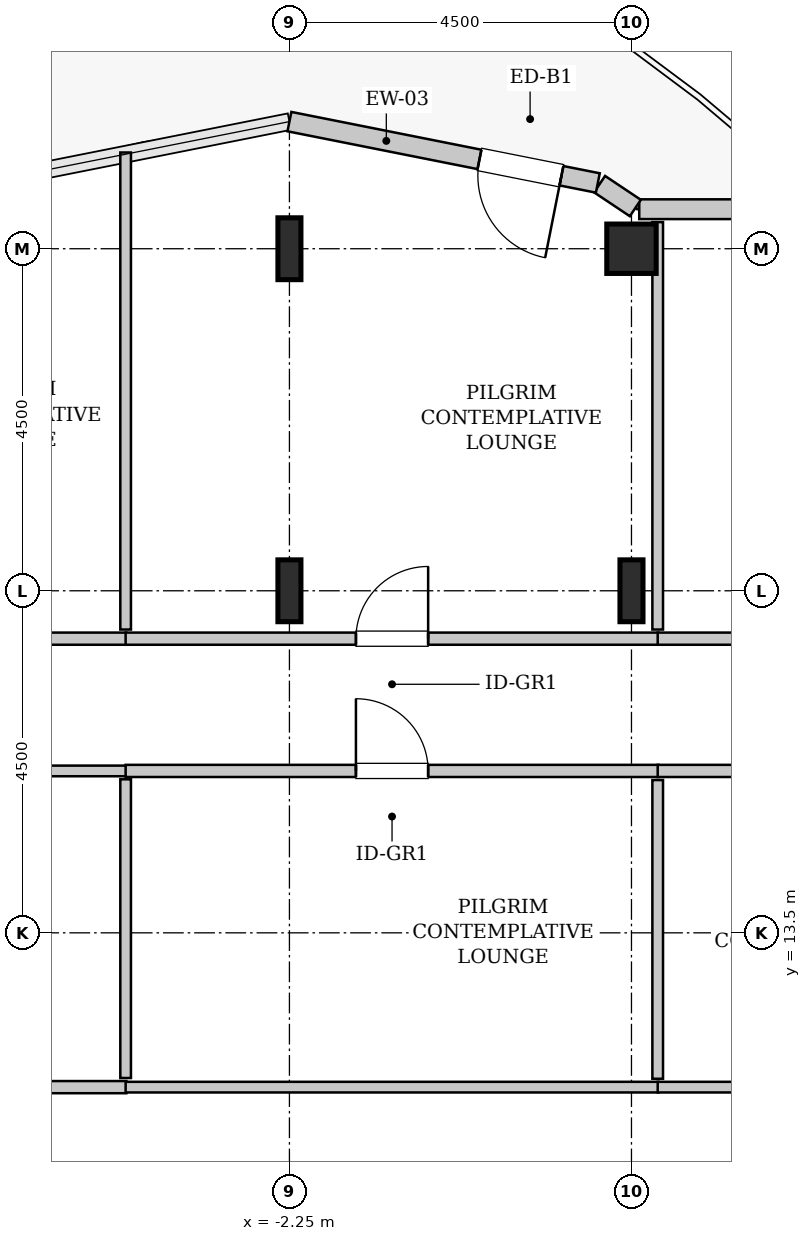
"""IFC4 building model, lengths in metres.
Left out: names, types, materials, properties, quantities, classifications, styles, units other than length and angle.
Written with IfcOpenShell. Run it as: python <this file> out.ifc"""

import sys

from ifc_helpers import new_model, si_unit, direction, frame, frame_2d, origin, origin_2d, place, context, subcontext, project, spatial, rectangle, hollow_rectangle, i_section, extrude, source, transform, mapped, element, fill, save


model = new_model("IFC4")
c1 = context("Model", 3, precision=1e-05, world=origin(), true_north=direction((0.0, 1.0)))
c2 = subcontext(c1, "Body", "Model", "MODEL_VIEW")
j1 = project(units=[si_unit("LENGTHUNIT", "METRE"), si_unit("PLANEANGLEUNIT", "RADIAN")], contexts=[c1])
p1 = place(None, origin())
s1 = spatial("IfcSite", under=j1, at=p1, CompositionType="ELEMENT")
p2 = place(p1, origin())
s2 = spatial("IfcBuilding", under=s1, at=p2, CompositionType="ELEMENT")
p3 = place(p2, frame((0.0, 0.0, 256.0)))
s3 = spatial("IfcBuildingStorey", under=s2, at=p3, CompositionType="ELEMENT", Elevation=256.0)
m1 = source(origin(), c2, "Body", "SweptSolid", [
    extrude(i_section(OverallWidth=0.303, OverallDepth=0.814, WebThickness=0.021, FlangeThickness=0.04, FilletRadius=0.03, at=origin_2d()), origin(), (0.0, 0.0, 1.0), 3.8),
])
for number, where, z_axis, x_axis in (
    (1, (-2.25, 18.0, 0.0), (0.0, 0.0, 1.0), (1.0, 0.0, 0.0)),
    (2, (-2.25, 22.5, 0.0), (0.0, 0.0, 1.0), (1.0, 0.0, 0.0)),
    (3, (2.25, 18.0, 0.0), (0.0, 0.0, 1.0), (1.0, 0.0, 0.0)),
):
    element("IfcColumn", number, at=place(p3, frame(where, z_axis=z_axis, x_axis=x_axis)), inside=s3, PredefinedType="COLUMN", context=c2, shape_type="MappedRepresentation", body=[
        mapped(m1, transform((0.0, 0.0, 0.0), x_axis=(1.0, 0.0, 0.0), y_axis=(0.0, 1.0, 0.0), z_axis=(0.0, 0.0, 1.0), scale=1.0)),
    ])
m2 = source(origin(), c2, "Body", "SweptSolid", [
    extrude(hollow_rectangle(XDim=0.65, YDim=0.65, WallThickness=0.032, InnerFilletRadius=0.032, OuterFilletRadius=0.064, at=origin_2d()), origin(), (0.0, 0.0, 1.0), 3.8),
])
p4 = place(p3, frame((2.25, 22.5, 0.0), z_axis=(0.0, 0.0, 1.0), x_axis=(1.0, 0.0, 0.0)))
e4 = element("IfcColumn", 4, at=p4, inside=s3, PredefinedType="COLUMN", context=c2, shape_type="MappedRepresentation", body=[
    mapped(m2, transform((0.0, 0.0, 0.0), x_axis=(1.0, 0.0, 0.0), y_axis=(0.0, 1.0, 0.0), z_axis=(0.0, 0.0, 1.0), scale=1.0)),
])
m3 = source(origin(), c2, "Body", "SweptSolid", [
    extrude(rectangle(XDim=1.37, YDim=0.26, at=frame_2d((0.685, 0.0))), origin(), (0.0, 0.0, 1.0), 3.5),
])
p5 = place(p3, frame((3.722, 23.02, 0.0), z_axis=(0.0, 0.0, 1.0), x_axis=(-1.0, 0.0, 0.0)))
e5 = element("IfcWall", 5, at=p5, inside=s3, PredefinedType="SOLIDWALL", context=c2, shape_type="MappedRepresentation", body=[
    mapped(m3, transform((0.0, 0.0, 0.0), x_axis=(1.0, 0.0, 0.0), y_axis=(0.0, 1.0, 0.0), z_axis=(0.0, 0.0, 1.0), scale=1.0)),
])
m4 = source(origin(), c2, "Body", "SweptSolid", [
    extrude(rectangle(XDim=0.565, YDim=0.26, at=frame_2d((0.283, 0.0))), origin(), (0.0, 0.0, 1.0), 3.5),
])
p6 = place(p3, frame((2.301, 23.036, 0.0), z_axis=(0.0, 0.0, 1.0), x_axis=(-0.831651492666, 0.555297933317, 0.0)))
e6 = element("IfcWall", 6, at=p6, inside=s3, PredefinedType="SOLIDWALL", context=c2, shape_type="MappedRepresentation", body=[
    mapped(m4, transform((0.0, 0.0, 0.0), x_axis=(1.0, 0.0, 0.0), y_axis=(0.0, 1.0, 0.0), z_axis=(0.0, 0.0, 1.0), scale=1.0)),
])
m5 = source(origin(), c2, "Body", "SweptSolid", [
    extrude(rectangle(XDim=4.137, YDim=0.26, at=frame_2d((2.068, 0.0))), origin(), (0.0, 0.0, 1.0), 3.5),
])
p7 = place(p3, frame((1.807, 23.365, 0.0), z_axis=(0.0, 0.0, 1.0), x_axis=(-0.980782170794, 0.195105954428, 0.0)))
e7 = element("IfcWall", 7, at=p7, inside=s3, PredefinedType="SOLIDWALL", context=c2, shape_type="MappedRepresentation", body=[
    mapped(m5, transform((0.0, 0.0, 0.0), x_axis=(1.0, 0.0, 0.0), y_axis=(0.0, 1.0, 0.0), z_axis=(0.0, 0.0, 1.0), scale=1.0)),
])
p8 = place(p7, frame((0.488, 0.0, 0.0)))
e8 = element("IfcOpeningElement", 8, at=p8, cuts=e7, PredefinedType="OPENING", context=c2, shape_type="SweptSolid", body=[
    extrude(rectangle(XDim=1.1, YDim=2.2, at=frame_2d((0.55, 1.1))), frame((0.0, 0.14, 0.0), z_axis=(0.0, -1.0, 0.0), x_axis=(1.0, 0.0, 0.0)), (0.0, 0.0, 1.0), 0.28),
])
m6 = source(origin(), c2, "Body", "SweptSolid", [
    extrude(rectangle(XDim=7.615, YDim=0.16, at=frame_2d((3.808, 0.0))), origin(), (0.0, 0.0, 1.0), 3.485),
])
p9 = place(p3, frame((-12.01, 11.47, 0.0), z_axis=(0.0, 0.0, 1.0), x_axis=(1.0, 0.0, 0.0)))
e9 = element("IfcWall", 9, at=p9, inside=s3, PredefinedType="PARTITIONING", context=c2, shape_type="MappedRepresentation", body=[
    mapped(m6, transform((0.0, 0.0, 0.0), x_axis=(1.0, 0.0, 0.0), y_axis=(0.0, 1.0, 0.0), z_axis=(0.0, 0.0, 1.0), scale=1.0)),
])
p10 = place(p9, frame((3.333, 0.0, 0.0)))
e10 = element("IfcOpeningElement", 10, at=p10, cuts=e9, PredefinedType="OPENING", context=c2, shape_type="SweptSolid", body=[
    extrude(rectangle(XDim=0.95, YDim=2.1, at=frame_2d((0.475, 1.05))), frame((0.0, 0.09, 0.0), z_axis=(0.0, -1.0, 0.0), x_axis=(1.0, 0.0, 0.0)), (0.0, 0.0, 1.0), 0.18),
])
m7 = source(origin(), c2, "Body", "SweptSolid", [
    extrude(rectangle(XDim=7.615, YDim=0.14, at=frame_2d((3.808, 0.0))), origin(), (0.0, 0.0, 1.0), 3.485),
])
p11 = place(p3, frame((-12.01, 15.63, 0.0), z_axis=(0.0, 0.0, 1.0), x_axis=(1.0, 0.0, 0.0)))
e11 = element("IfcWall", 11, at=p11, inside=s3, PredefinedType="PARTITIONING", context=c2, shape_type="MappedRepresentation", body=[
    mapped(m7, transform((0.0, 0.0, 0.0), x_axis=(1.0, 0.0, 0.0), y_axis=(0.0, 1.0, 0.0), z_axis=(0.0, 0.0, 1.0), scale=1.0)),
])
m8 = source(origin(), c2, "Body", "SweptSolid", [
    extrude(rectangle(XDim=3.93, YDim=0.14, at=frame_2d((1.965, 0.0))), origin(), (0.0, 0.0, 1.0), 3.485),
])
p12 = place(p3, frame((-4.405, 11.59, 0.0), z_axis=(0.0, 0.0, 1.0), x_axis=(0.0, 1.0, 0.0)))
e12 = element("IfcWall", 12, at=p12, inside=s3, PredefinedType="PARTITIONING", context=c2, shape_type="MappedRepresentation", body=[
    mapped(m8, transform((0.0, 0.0, 0.0), x_axis=(1.0, 0.0, 0.0), y_axis=(0.0, 1.0, 0.0), z_axis=(0.0, 0.0, 1.0), scale=1.0)),
])
m9 = source(origin(), c2, "Body", "SweptSolid", [
    extrude(rectangle(XDim=3.045, YDim=0.16, at=frame_2d((1.522, 0.0))), origin(), (0.0, 0.0, 1.0), 3.485),
])
p13 = place(p3, frame((-7.44, 17.37, 0.0), z_axis=(0.0, 0.0, 1.0), x_axis=(1.0, 0.0, 0.0)))
e13 = element("IfcWall", 13, at=p13, inside=s3, PredefinedType="PARTITIONING", context=c2, shape_type="MappedRepresentation", body=[
    mapped(m9, transform((0.0, 0.0, 0.0), x_axis=(1.0, 0.0, 0.0), y_axis=(0.0, 1.0, 0.0), z_axis=(0.0, 0.0, 1.0), scale=1.0)),
])
p14 = place(p13, frame((1.048, 0.0, 0.0)))
e14 = element("IfcOpeningElement", 14, at=p14, cuts=e13, PredefinedType="OPENING", context=c2, shape_type="SweptSolid", body=[
    extrude(rectangle(XDim=0.95, YDim=2.1, at=frame_2d((0.475, 1.05))), frame((0.0, 0.09, 0.0), z_axis=(0.0, -1.0, 0.0), x_axis=(1.0, 0.0, 0.0)), (0.0, 0.0, 1.0), 0.18),
])
m10 = source(origin(), c2, "Body", "SweptSolid", [
    extrude(rectangle(XDim=6.276, YDim=0.14, at=frame_2d((3.138, 0.0))), origin(), (0.0, 0.0, 1.0), 3.485),
])
p15 = place(p3, frame((-4.405, 17.49, 0.0), z_axis=(0.0, 0.0, 1.0), x_axis=(0.0, 1.0, 0.0)))
e15 = element("IfcWall", 15, at=p15, inside=s3, PredefinedType="PARTITIONING", context=c2, shape_type="MappedRepresentation", body=[
    mapped(m10, transform((0.0, 0.0, 0.0), x_axis=(1.0, 0.0, 0.0), y_axis=(0.0, 1.0, 0.0), z_axis=(0.0, 0.0, 1.0), scale=1.0)),
])
m11 = source(origin(), c2, "Body", "SweptSolid", [
    extrude(rectangle(XDim=7.01, YDim=0.16, at=frame_2d((3.505, 0.0))), origin(), (0.0, 0.0, 1.0), 3.485),
])
p16 = place(p3, frame((-4.405, 17.37, 0.0), z_axis=(0.0, 0.0, 1.0), x_axis=(1.0, 0.0, 0.0)))
e16 = element("IfcWall", 16, at=p16, inside=s3, PredefinedType="PARTITIONING", context=c2, shape_type="MappedRepresentation", body=[
    mapped(m11, transform((0.0, 0.0, 0.0), x_axis=(1.0, 0.0, 0.0), y_axis=(0.0, 1.0, 0.0), z_axis=(0.0, 0.0, 1.0), scale=1.0)),
])
p17 = place(p16, frame((3.03, 0.0, 0.0)))
e17 = element("IfcOpeningElement", 17, at=p17, cuts=e16, PredefinedType="OPENING", context=c2, shape_type="SweptSolid", body=[
    extrude(rectangle(XDim=0.95, YDim=2.1, at=frame_2d((0.475, 1.05))), frame((0.0, 0.09, 0.0), z_axis=(0.0, -1.0, 0.0), x_axis=(1.0, 0.0, 0.0)), (0.0, 0.0, 1.0), 0.18),
])
m12 = source(origin(), c2, "Body", "SweptSolid", [
    extrude(rectangle(XDim=5.36, YDim=0.14, at=frame_2d((2.68, 0.0))), origin(), (0.0, 0.0, 1.0), 2.875),
])
p18 = place(p3, frame((2.595, 17.49, 0.0), z_axis=(0.0, 0.0, 1.0), x_axis=(0.0, 1.0, 0.0)))
e18 = element("IfcWall", 18, at=p18, inside=s3, PredefinedType="PARTITIONING", context=c2, shape_type="MappedRepresentation", body=[
    mapped(m12, transform((0.0, 0.0, 0.0), x_axis=(1.0, 0.0, 0.0), y_axis=(0.0, 1.0, 0.0), z_axis=(0.0, 0.0, 1.0), scale=1.0)),
])
p19 = place(p3, frame((-4.405, 15.63, 0.0), z_axis=(0.0, 0.0, 1.0), x_axis=(1.0, 0.0, 0.0)))
e19 = element("IfcWall", 19, at=p19, inside=s3, PredefinedType="PARTITIONING", context=c2, shape_type="MappedRepresentation", body=[
    mapped(m11, transform((0.0, 0.0, 0.0), x_axis=(1.0, 0.0, 0.0), y_axis=(0.0, 1.0, 0.0), z_axis=(0.0, 0.0, 1.0), scale=1.0)),
])
p20 = place(p19, frame((3.03, 0.0, 0.0)))
e20 = element("IfcOpeningElement", 20, at=p20, cuts=e19, PredefinedType="OPENING", context=c2, shape_type="SweptSolid", body=[
    extrude(rectangle(XDim=0.95, YDim=2.1, at=frame_2d((0.475, 1.05))), frame((0.0, 0.09, 0.0), z_axis=(0.0, -1.0, 0.0), x_axis=(1.0, 0.0, 0.0)), (0.0, 0.0, 1.0), 0.18),
])
m13 = source(origin(), c2, "Body", "SweptSolid", [
    extrude(rectangle(XDim=7.01, YDim=0.14, at=frame_2d((3.505, 0.0))), origin(), (0.0, 0.0, 1.0), 3.485),
])
p21 = place(p3, frame((-4.405, 11.47, 0.0), z_axis=(0.0, 0.0, 1.0), x_axis=(1.0, 0.0, 0.0)))
e21 = element("IfcWall", 21, at=p21, inside=s3, PredefinedType="PARTITIONING", context=c2, shape_type="MappedRepresentation", body=[
    mapped(m13, transform((0.0, 0.0, 0.0), x_axis=(1.0, 0.0, 0.0), y_axis=(0.0, 1.0, 0.0), z_axis=(0.0, 0.0, 1.0), scale=1.0)),
])
p22 = place(p3, frame((2.595, 11.58, 0.0), z_axis=(0.0, 0.0, 1.0), x_axis=(0.0, 1.0, 0.0)))
e22 = element("IfcWall", 22, at=p22, inside=s3, PredefinedType="PARTITIONING", context=c2, shape_type="MappedRepresentation", body=[
    mapped(m8, transform((0.0, 0.0, 0.0), x_axis=(1.0, 0.0, 0.0), y_axis=(0.0, 1.0, 0.0), z_axis=(0.0, 0.0, 1.0), scale=1.0)),
])
m14 = source(origin(), c2, "Body", "SweptSolid", [
    extrude(rectangle(XDim=5.61, YDim=0.16, at=frame_2d((2.805, 0.0))), origin(), (0.0, 0.0, 1.0), 3.485),
])
p23 = place(p3, frame((2.595, 17.37, 0.0), z_axis=(0.0, 0.0, 1.0), x_axis=(1.0, 0.0, 0.0)))
e23 = element("IfcWall", 23, at=p23, inside=s3, PredefinedType="PARTITIONING", context=c2, shape_type="MappedRepresentation", body=[
    mapped(m14, transform((0.0, 0.0, 0.0), x_axis=(1.0, 0.0, 0.0), y_axis=(0.0, 1.0, 0.0), z_axis=(0.0, 0.0, 1.0), scale=1.0)),
])
p24 = place(p23, frame((2.33, 0.0, 0.0)))
e24 = element("IfcOpeningElement", 24, at=p24, cuts=e23, PredefinedType="OPENING", context=c2, shape_type="SweptSolid", body=[
    extrude(rectangle(XDim=0.95, YDim=2.1, at=frame_2d((0.475, 1.05))), frame((0.0, 0.09, 0.0), z_axis=(0.0, -1.0, 0.0), x_axis=(1.0, 0.0, 0.0)), (0.0, 0.0, 1.0), 0.18),
])
p25 = place(p3, frame((2.595, 15.63, 0.0), z_axis=(0.0, 0.0, 1.0), x_axis=(1.0, 0.0, 0.0)))
e25 = element("IfcWall", 25, at=p25, inside=s3, PredefinedType="PARTITIONING", context=c2, shape_type="MappedRepresentation", body=[
    mapped(m14, transform((0.0, 0.0, 0.0), x_axis=(1.0, 0.0, 0.0), y_axis=(0.0, 1.0, 0.0), z_axis=(0.0, 0.0, 1.0), scale=1.0)),
])
p26 = place(p25, frame((2.33, 0.0, 0.0)))
e26 = element("IfcOpeningElement", 26, at=p26, cuts=e25, PredefinedType="OPENING", context=c2, shape_type="SweptSolid", body=[
    extrude(rectangle(XDim=0.95, YDim=2.1, at=frame_2d((0.475, 1.05))), frame((0.0, 0.09, 0.0), z_axis=(0.0, -1.0, 0.0), x_axis=(1.0, 0.0, 0.0)), (0.0, 0.0, 1.0), 0.18),
])
m15 = source(origin(), c2, "Body", "SweptSolid", [
    extrude(rectangle(XDim=5.61, YDim=0.14, at=frame_2d((2.805, 0.0))), origin(), (0.0, 0.0, 1.0), 3.485),
])
p27 = place(p3, frame((2.595, 11.47, 0.0), z_axis=(0.0, 0.0, 1.0), x_axis=(1.0, 0.0, 0.0)))
e27 = element("IfcWall", 27, at=p27, inside=s3, PredefinedType="PARTITIONING", context=c2, shape_type="MappedRepresentation", body=[
    mapped(m15, transform((0.0, 0.0, 0.0), x_axis=(1.0, 0.0, 0.0), y_axis=(0.0, 1.0, 0.0), z_axis=(0.0, 0.0, 1.0), scale=1.0)),
])
m16 = source(origin(), c2, "Body", "SweptSolid", [
    extrude(rectangle(XDim=1.1, YDim=2.2, at=frame_2d((0.55, 1.1))), frame((0.0, 0.025, 0.0), z_axis=(0.0, -1.0, 0.0), x_axis=(1.0, 0.0, 0.0)), (0.0, 0.0, 1.0), 0.05),
])
p28 = place(p8, origin())
e28 = element("IfcDoor", 28, at=p28, inside=s3, OperationType="SINGLE_SWING_LEFT", PredefinedType="DOOR", context=c2, shape_type="MappedRepresentation", body=[
    mapped(m16, transform((0.0, 0.0, 0.0), x_axis=(1.0, 0.0, 0.0), y_axis=(0.0, 1.0, 0.0), z_axis=(0.0, 0.0, 1.0), scale=1.0)),
])
fill(e8, e28)
m17 = source(origin(), c2, "Body", "SweptSolid", [
    extrude(rectangle(XDim=0.95, YDim=2.1, at=frame_2d((0.475, 1.05))), frame((0.0, 0.025, 0.0), z_axis=(0.0, -1.0, 0.0), x_axis=(1.0, 0.0, 0.0)), (0.0, 0.0, 1.0), 0.05),
])
p29 = place(p17, origin())
e29 = element("IfcDoor", 29, at=p29, inside=s3, OperationType="SINGLE_SWING_RIGHT", PredefinedType="DOOR", context=c2, shape_type="MappedRepresentation", body=[
    mapped(m17, transform((0.0, 0.0, 0.0), x_axis=(1.0, 0.0, 0.0), y_axis=(0.0, 1.0, 0.0), z_axis=(0.0, 0.0, 1.0), scale=1.0)),
])
fill(e17, e29)
p30 = place(p20, origin())
e30 = element("IfcDoor", 30, at=p30, inside=s3, OperationType="SINGLE_SWING_LEFT", PredefinedType="DOOR", context=c2, shape_type="MappedRepresentation", body=[
    mapped(m17, transform((0.0, 0.0, 0.0), x_axis=(1.0, 0.0, 0.0), y_axis=(0.0, 1.0, 0.0), z_axis=(0.0, 0.0, 1.0), scale=1.0)),
])
fill(e20, e30)
save(model, sys.argv[1])
